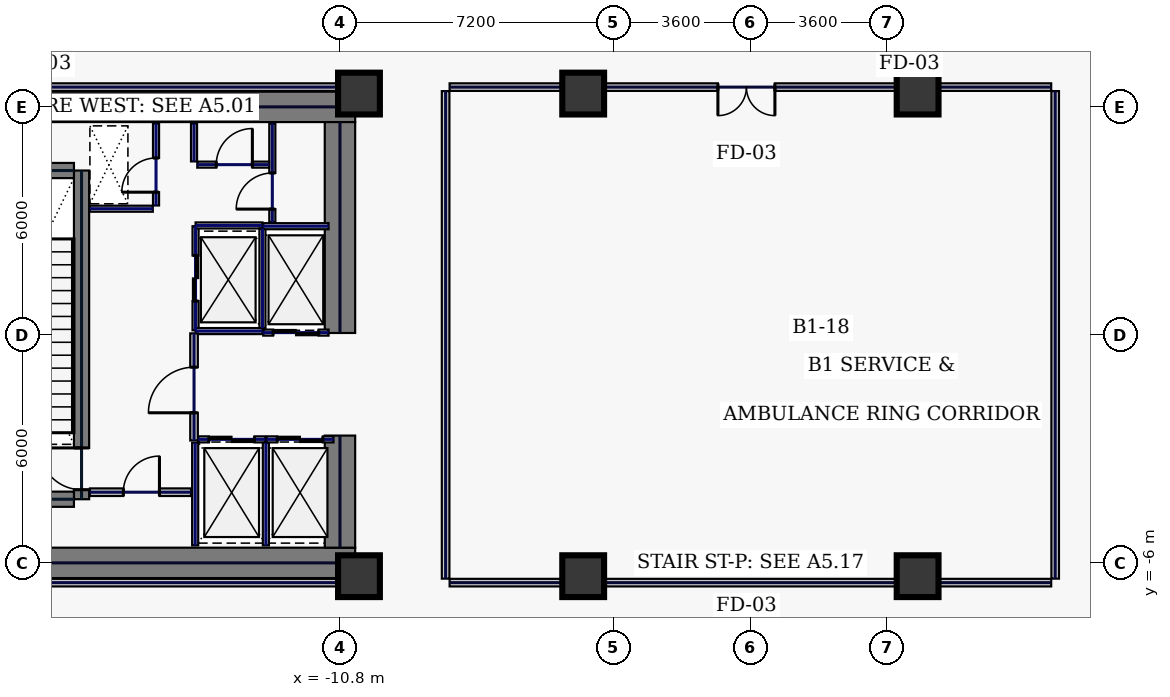
"""IFC4 building model, lengths in metres.
Left out: names, types, materials, properties, quantities, classifications, styles, units other than length and angle.
Written with IfcOpenShell. Run it as: python <this file> out.ifc"""

import sys

from ifc_helpers import new_model, si_unit, direction, frame, frame_2d, origin, origin_2d, place, context, subcontext, project, spatial, rectangle, extrude, element, fill, save


model = new_model("IFC4")
c1 = context("Model", 3, precision=1e-05, world=origin(), true_north=direction((0.0, 1.0)))
c2 = subcontext(c1, "Body", "Model", "MODEL_VIEW")
j1 = project(units=[si_unit("LENGTHUNIT", "METRE"), si_unit("PLANEANGLEUNIT", "RADIAN")], contexts=[c1])
p1 = place(None, origin())
s1 = spatial("IfcSite", under=j1, at=p1, CompositionType="ELEMENT")
p2 = place(p1, origin())
s2 = spatial("IfcBuilding", under=s1, at=p2, CompositionType="ELEMENT")
p3 = place(p2, frame((0.0, 0.0, -5.4)))
s3 = spatial("IfcBuildingStorey", under=s2, at=p3, CompositionType="ELEMENT", Elevation=-5.4)
for number, where, z_axis, x_axis in (
    (1, (-22.0, 6.0, 0.0), (0.0, 0.0, 1.0), (1.0, 0.0, 0.0)),
    (2, (-22.0, -6.0, 0.0), (0.0, 0.0, 1.0), (1.0, 0.0, 0.0)),
):
    element("IfcWall", number, at=place(p3, frame(where, z_axis=z_axis, x_axis=x_axis)), inside=s3, PredefinedType="SHEAR", context=c2, shape_type="SweptSolid", body=[
        extrude(rectangle(XDim=11.6, YDim=0.8, at=frame_2d((5.8, 0.0))), origin(), (0.0, 0.0, 1.0), 5.05),
    ])
p4 = place(p3, frame((-10.8, -5.6, 0.0), z_axis=(0.0, 0.0, 1.0), x_axis=(0.0, 1.0, 0.0)))
e3 = element("IfcWall", 3, at=p4, inside=s3, PredefinedType="SHEAR", context=c2, shape_type="SweptSolid", body=[
    extrude(rectangle(XDim=2.95, YDim=0.8, at=frame_2d((1.475, 0.0))), origin(), (0.0, 0.0, 1.0), 5.05),
])
p5 = place(p3, frame((-10.8, 0.05, 0.0), z_axis=(0.0, 0.0, 1.0), x_axis=(0.0, 1.0, 0.0)))
e4 = element("IfcWall", 4, at=p5, inside=s3, PredefinedType="SHEAR", context=c2, shape_type="SweptSolid", body=[
    extrude(rectangle(XDim=5.55, YDim=0.8, at=frame_2d((2.775, 0.0))), origin(), (0.0, 0.0, 1.0), 5.05),
])
p6 = place(p3, frame((-17.6, -4.325, 0.0), z_axis=(0.0, 0.0, 1.0), x_axis=(0.0, 1.0, 0.0)))
e5 = element("IfcWall", 5, at=p6, inside=s3, PredefinedType="SHEAR", context=c2, shape_type="SweptSolid", body=[
    extrude(rectangle(XDim=8.65, YDim=0.4, at=frame_2d((4.325, 0.0))), origin(), (0.0, 0.0, 1.0), 5.05),
])
p7 = place(p6, frame((0.25, 0.0, 0.0)))
e6 = element("IfcOpeningElement", 6, at=p7, cuts=e5, PredefinedType="OPENING", context=c2, shape_type="SweptSolid", body=[
    extrude(rectangle(XDim=1.1, YDim=2.2, at=frame_2d((0.55, 1.1))), frame((0.0, 0.21, 0.0), z_axis=(0.0, -1.0, 0.0), x_axis=(1.0, 0.0, 0.0)), (0.0, 0.0, 1.0), 0.42),
])
for number, where, z_axis, x_axis in (
    (7, (-21.2, -4.325, 0.0), (0.0, 0.0, 1.0), (1.0, 0.0, 0.0)),
    (8, (-21.2, 4.325, 0.0), (0.0, 0.0, 1.0), (1.0, 0.0, 0.0)),
):
    element("IfcWall", number, at=place(p3, frame(where, z_axis=z_axis, x_axis=x_axis)), inside=s3, PredefinedType="SHEAR", context=c2, shape_type="SweptSolid", body=[
        extrude(rectangle(XDim=3.4, YDim=0.4, at=frame_2d((1.7, 0.0))), origin(), (0.0, 0.0, 1.0), 5.05),
    ])
for number, where, z_axis, x_axis in (
    (9, (-10.3, -6.35, 0.0), (0.0, 0.0, 1.0), (1.0, 0.0, 0.0)),
    (10, (-10.3, 6.35, 0.0), (0.0, 0.0, 1.0), (1.0, 0.0, 0.0)),
    (11, (-4.4, -6.35, 0.0), (0.0, 0.0, 1.0), (1.0, 0.0, 0.0)),
    (12, (4.4, -6.35, 0.0), (0.0, 0.0, 1.0), (1.0, 0.0, 0.0)),
    (13, (-4.4, 6.35, 0.0), (0.0, 0.0, 1.0), (1.0, 0.0, 0.0)),
    (14, (4.4, 6.35, 0.0), (0.0, 0.0, 1.0), (1.0, 0.0, 0.0)),
):
    element("IfcColumn", number, at=place(p3, frame(where, z_axis=z_axis, x_axis=x_axis)), inside=s3, PredefinedType="COLUMN", context=c2, shape_type="SweptSolid", body=[
        extrude(rectangle(XDim=1.1, YDim=1.1, at=origin_2d()), origin(), (0.0, 0.0, 1.0), 5.05),
    ])
p8 = place(p3, frame((-14.6, 0.12, 0.0), z_axis=(0.0, 0.0, 1.0), x_axis=(0.0, 1.0, 0.0)))
e15 = element("IfcWall", 15, at=p8, inside=s3, PredefinedType="PARTITIONING", context=c2, shape_type="SweptSolid", body=[
    extrude(rectangle(XDim=2.74, YDim=0.16, at=frame_2d((1.37, 0.0))), origin(), (0.0, 0.0, 1.0), 5.05),
])
p9 = place(p8, frame((0.77, 0.0, 0.0)))
e16 = element("IfcOpeningElement", 16, at=p9, cuts=e15, PredefinedType="OPENING", context=c2, shape_type="SweptSolid", body=[
    extrude(rectangle(XDim=1.2, YDim=2.2, at=frame_2d((0.6, 1.1))), frame((0.0, 0.09, 0.0), z_axis=(0.0, -1.0, 0.0), x_axis=(1.0, 0.0, 0.0)), (0.0, 0.0, 1.0), 0.18),
])
for number, where, z_axis, x_axis in (
    (17, (-14.6, 0.1, 0.0), (0.0, 0.0, 1.0), (1.0, 0.0, 0.0)),
    (18, (-14.6, 2.88, 0.0), (0.0, 0.0, 1.0), (1.0, 0.0, 0.0)),
):
    element("IfcWall", number, at=place(p3, frame(where, z_axis=z_axis, x_axis=x_axis)), inside=s3, PredefinedType="PARTITIONING", context=c2, shape_type="SweptSolid", body=[
        extrude(rectangle(XDim=1.76, YDim=0.16, at=frame_2d((0.88, 0.0))), origin(), (0.0, 0.0, 1.0), 5.05),
    ])
p10 = place(p3, frame((-12.84, 0.18, 0.0), z_axis=(0.0, 0.0, 1.0), x_axis=(0.0, 1.0, 0.0)))
e19 = element("IfcWall", 19, at=p10, inside=s3, PredefinedType="PARTITIONING", context=c2, shape_type="SweptSolid", body=[
    extrude(rectangle(XDim=2.62, YDim=0.16, at=frame_2d((1.31, 0.0))), origin(), (0.0, 0.0, 1.0), 5.05),
])
p11 = place(p3, frame((-14.53, -2.75, 0.0), z_axis=(0.0, 0.0, 1.0), x_axis=(1.0, 0.0, 0.0)))
e20 = element("IfcWall", 20, at=p11, inside=s3, PredefinedType="PARTITIONING", context=c2, shape_type="SweptSolid", body=[
    extrude(rectangle(XDim=1.76, YDim=0.16, at=frame_2d((0.88, 0.0))), origin(), (0.0, 0.0, 1.0), 5.05),
])
p12 = place(p11, frame((0.28, 0.0, 0.0)))
e21 = element("IfcOpeningElement", 21, at=p12, cuts=e20, PredefinedType="OPENING", context=c2, shape_type="SweptSolid", body=[
    extrude(rectangle(XDim=1.2, YDim=2.2, at=frame_2d((0.6, 1.1))), frame((0.0, 0.09, 0.0), z_axis=(0.0, -1.0, 0.0), x_axis=(1.0, 0.0, 0.0)), (0.0, 0.0, 1.0), 0.18),
])
for number, where, z_axis, x_axis in (
    (22, (-12.75, -5.54, 0.0), (0.0, 0.0, 1.0), (0.0, 1.0, 0.0)),
    (23, (-14.61, -5.54, 0.0), (0.0, 0.0, 1.0), (0.0, 1.0, 0.0)),
):
    element("IfcWall", number, at=place(p3, frame(where, z_axis=z_axis, x_axis=x_axis)), inside=s3, PredefinedType="PARTITIONING", context=c2, shape_type="SweptSolid", body=[
        extrude(rectangle(XDim=2.7, YDim=0.16, at=frame_2d((1.35, 0.0))), origin(), (0.0, 0.0, 1.0), 5.05),
    ])
p13 = place(p3, frame((-12.73, -2.75, 0.0), z_axis=(0.0, 0.0, 1.0), x_axis=(1.0, 0.0, 0.0)))
e24 = element("IfcWall", 24, at=p13, inside=s3, PredefinedType="PARTITIONING", context=c2, shape_type="SweptSolid", body=[
    extrude(rectangle(XDim=1.76, YDim=0.16, at=frame_2d((0.88, 0.0))), origin(), (0.0, 0.0, 1.0), 5.05),
])
p14 = place(p13, frame((0.28, 0.0, 0.0)))
e25 = element("IfcOpeningElement", 25, at=p14, cuts=e24, PredefinedType="OPENING", context=c2, shape_type="SweptSolid", body=[
    extrude(rectangle(XDim=1.2, YDim=2.2, at=frame_2d((0.6, 1.1))), frame((0.0, 0.09, 0.0), z_axis=(0.0, -1.0, 0.0), x_axis=(1.0, 0.0, 0.0)), (0.0, 0.0, 1.0), 0.18),
])
p15 = place(p3, frame((-12.82, 0.06, 0.0), z_axis=(0.0, 0.0, 1.0), x_axis=(1.0, 0.0, 0.0)))
e26 = element("IfcWall", 26, at=p15, inside=s3, PredefinedType="PARTITIONING", context=c2, shape_type="SweptSolid", body=[
    extrude(rectangle(XDim=1.72, YDim=0.16, at=frame_2d((0.86, 0.0))), origin(), (0.0, 0.0, 1.0), 5.05),
])
p16 = place(p15, frame((0.26, 0.0, 0.0)))
e27 = element("IfcOpeningElement", 27, at=p16, cuts=e26, PredefinedType="OPENING", context=c2, shape_type="SweptSolid", body=[
    extrude(rectangle(XDim=1.2, YDim=2.2, at=frame_2d((0.6, 1.1))), frame((0.0, 0.09, 0.0), z_axis=(0.0, -1.0, 0.0), x_axis=(1.0, 0.0, 0.0)), (0.0, 0.0, 1.0), 0.18),
])
p17 = place(p3, frame((-12.82, 2.86, 0.0), z_axis=(0.0, 0.0, 1.0), x_axis=(1.0, 0.0, 0.0)))
e28 = element("IfcWall", 28, at=p17, inside=s3, PredefinedType="PARTITIONING", context=c2, shape_type="SweptSolid", body=[
    extrude(rectangle(XDim=1.72, YDim=0.16, at=frame_2d((0.86, 0.0))), origin(), (0.0, 0.0, 1.0), 5.05),
])
p18 = place(p3, frame((-15.64, 3.405, 0.0), z_axis=(0.0, 0.0, 1.0), x_axis=(0.0, 1.0, 0.0)))
e29 = element("IfcWall", 29, at=p18, inside=s3, PredefinedType="PARTITIONING", context=c2, shape_type="SweptSolid", body=[
    extrude(rectangle(XDim=2.155, YDim=0.16, at=frame_2d((1.078, 0.0))), origin(), (0.0, 0.0, 1.0), 5.05),
])
p19 = place(p18, frame((0.35, 0.0, 0.0)))
e30 = element("IfcOpeningElement", 30, at=p19, cuts=e29, PredefinedType="OPENING", context=c2, shape_type="SweptSolid", body=[
    extrude(rectangle(XDim=0.9, YDim=2.2, at=frame_2d((0.45, 1.1))), frame((0.0, 0.09, 0.0), z_axis=(0.0, -1.0, 0.0), x_axis=(1.0, 0.0, 0.0)), (0.0, 0.0, 1.0), 0.18),
])
p20 = place(p3, frame((-17.38, 3.32, 0.0), z_axis=(0.0, 0.0, 1.0), x_axis=(1.0, 0.0, 0.0)))
e31 = element("IfcWall", 31, at=p20, inside=s3, PredefinedType="PARTITIONING", context=c2, shape_type="SweptSolid", body=[
    extrude(rectangle(XDim=1.655, YDim=0.16, at=frame_2d((0.827, 0.0))), origin(), (0.0, 0.0, 1.0), 5.05),
])
p21 = place(p3, frame((-17.38, -4.14, 0.0), z_axis=(0.0, 0.0, 1.0), x_axis=(1.0, 0.0, 0.0)))
e32 = element("IfcWall", 32, at=p21, inside=s3, PredefinedType="SOLIDWALL", context=c2, shape_type="SweptSolid", body=[
    extrude(rectangle(XDim=2.66, YDim=0.2, at=frame_2d((1.33, 0.0))), origin(), (0.0, 0.0, 1.0), 5.05),
])
p22 = place(p21, frame((0.88, 0.0, 0.0)))
e33 = element("IfcOpeningElement", 33, at=p22, cuts=e32, PredefinedType="OPENING", context=c2, shape_type="SweptSolid", body=[
    extrude(rectangle(XDim=0.95, YDim=2.2, at=frame_2d((0.475, 1.1))), frame((0.0, 0.11, 0.0), z_axis=(0.0, -1.0, 0.0), x_axis=(1.0, 0.0, 0.0)), (0.0, 0.0, 1.0), 0.22),
])
p23 = place(p3, frame((-12.58, 2.96, 0.0), z_axis=(0.0, 0.0, 1.0), x_axis=(0.0, 1.0, 0.0)))
e34 = element("IfcWall", 34, at=p23, inside=s3, PredefinedType="PARTITIONING", context=c2, shape_type="SweptSolid", body=[
    extrude(rectangle(XDim=2.6, YDim=0.16, at=frame_2d((1.3, 0.0))), origin(), (0.0, 0.0, 1.0), 5.05),
])
p24 = place(p23, frame((0.35, 0.0, 0.0)))
e35 = element("IfcOpeningElement", 35, at=p24, cuts=e34, PredefinedType="OPENING", context=c2, shape_type="SweptSolid", body=[
    extrude(rectangle(XDim=0.95, YDim=2.2, at=frame_2d((0.475, 1.1))), frame((0.0, 0.09, 0.0), z_axis=(0.0, -1.0, 0.0), x_axis=(1.0, 0.0, 0.0)), (0.0, 0.0, 1.0), 0.18),
])
p25 = place(p3, frame((-14.555, 4.48, 0.0), z_axis=(0.0, 0.0, 1.0), x_axis=(1.0, 0.0, 0.0)))
e36 = element("IfcWall", 36, at=p25, inside=s3, PredefinedType="PARTITIONING", context=c2, shape_type="SweptSolid", body=[
    extrude(rectangle(XDim=1.89, YDim=0.16, at=frame_2d((0.945, 0.0))), origin(), (0.0, 0.0, 1.0), 5.05),
])
p26 = place(p25, frame((0.5, 0.0, 0.0)))
e37 = element("IfcOpeningElement", 37, at=p26, cuts=e36, PredefinedType="OPENING", context=c2, shape_type="SweptSolid", body=[
    extrude(rectangle(XDim=0.95, YDim=2.2, at=frame_2d((0.475, 1.1))), frame((0.0, 0.09, 0.0), z_axis=(0.0, -1.0, 0.0), x_axis=(1.0, 0.0, 0.0)), (0.0, 0.0, 1.0), 0.18),
])
p27 = place(p3, frame((-14.64, 4.565, 0.0), z_axis=(0.0, 0.0, 1.0), x_axis=(0.0, 1.0, 0.0)))
e38 = element("IfcWall", 38, at=p27, inside=s3, PredefinedType="PARTITIONING", context=c2, shape_type="SweptSolid", body=[
    extrude(rectangle(XDim=0.995, YDim=0.16, at=frame_2d((0.498, 0.0))), origin(), (0.0, 0.0, 1.0), 5.05),
])
p28 = place(p3, frame((-14.64, -2.78, 0.0), z_axis=(0.0, 0.0, 1.0), x_axis=(0.0, 1.0, 0.0)))
e39 = element("IfcWall", 39, at=p28, inside=s3, PredefinedType="SOLIDWALL", context=c2, shape_type="SweptSolid", body=[
    extrude(rectangle(XDim=2.82, YDim=0.2, at=frame_2d((1.41, 0.0))), origin(), (0.0, 0.0, 1.0), 5.05),
])
p29 = place(p28, frame((0.73, 0.0, 0.0)))
e40 = element("IfcOpeningElement", 40, at=p29, cuts=e39, PredefinedType="OPENING", context=c2, shape_type="SweptSolid", body=[
    extrude(rectangle(XDim=1.2, YDim=2.2, at=frame_2d((0.6, 1.1))), frame((0.0, 0.11, 0.0), z_axis=(0.0, -1.0, 0.0), x_axis=(1.0, 0.0, 0.0)), (0.0, 0.0, 1.0), 0.22),
])
p30 = place(p3, frame((8.02, -6.415, 0.0), z_axis=(0.0, 0.0, 1.0), x_axis=(0.0, 1.0, 0.0)))
e41 = element("IfcWall", 41, at=p30, inside=s3, PredefinedType="SOLIDWALL", context=c2, shape_type="SweptSolid", body=[
    extrude(rectangle(XDim=12.83, YDim=0.2, at=frame_2d((6.415, 0.0))), origin(), (0.0, 0.0, 1.0), 5.05),
])
p31 = place(p3, frame((7.915, 6.52, 0.0), z_axis=(0.0, 0.0, 1.0), x_axis=(-1.0, 0.0, 0.0)))
e42 = element("IfcWall", 42, at=p31, inside=s3, PredefinedType="SOLIDWALL", context=c2, shape_type="SweptSolid", body=[
    extrude(rectangle(XDim=15.83, YDim=0.2, at=frame_2d((7.915, 0.0))), origin(), (0.0, 0.0, 1.0), 4.245),
])
p32 = place(p31, frame((7.27, 0.0, 0.0)))
e43 = element("IfcOpeningElement", 43, at=p32, cuts=e42, PredefinedType="OPENING", context=c2, shape_type="SweptSolid", body=[
    extrude(rectangle(XDim=1.5, YDim=2.3, at=frame_2d((0.75, 1.15))), frame((0.0, 0.11, 0.0), z_axis=(0.0, -1.0, 0.0), x_axis=(1.0, 0.0, 0.0)), (0.0, 0.0, 1.0), 0.22),
])
p33 = place(p3, frame((-8.02, 6.415, 0.0), z_axis=(0.0, 0.0, 1.0), x_axis=(0.0, -1.0, 0.0)))
e44 = element("IfcWall", 44, at=p33, inside=s3, PredefinedType="SOLIDWALL", context=c2, shape_type="SweptSolid", body=[
    extrude(rectangle(XDim=12.83, YDim=0.2, at=frame_2d((6.415, 0.0))), origin(), (0.0, 0.0, 1.0), 5.05),
])
p34 = place(p3, frame((-7.915, -6.52, 0.0), z_axis=(0.0, 0.0, 1.0), x_axis=(1.0, 0.0, 0.0)))
e45 = element("IfcWall", 45, at=p34, inside=s3, PredefinedType="SOLIDWALL", context=c2, shape_type="SweptSolid", body=[
    extrude(rectangle(XDim=15.83, YDim=0.2, at=frame_2d((7.915, 0.0))), origin(), (0.0, 0.0, 1.0), 4.245),
])
for number, where, z_axis, x_axis in (
    (46, (-10.38, 6.52, 0.0), (0.0, 0.0, 1.0), (-1.0, 0.0, 0.0)),
    (47, (-25.615, -6.52, 0.0), (0.0, 0.0, 1.0), (1.0, 0.0, 0.0)),
):
    element("IfcWall", number, at=place(p3, frame(where, z_axis=z_axis, x_axis=x_axis)), inside=s3, PredefinedType="SOLIDWALL", context=c2, shape_type="SweptSolid", body=[
        extrude(rectangle(XDim=15.235, YDim=0.2, at=frame_2d((7.618, 0.0))), origin(), (0.0, 0.0, 1.0), 5.05),
    ])
p35 = place(p7, origin())
e48 = element("IfcDoor", 48, at=p35, inside=s3, OperationType="SINGLE_SWING_RIGHT", PredefinedType="DOOR", context=c2, shape_type="SweptSolid", body=[
    extrude(rectangle(XDim=1.1, YDim=2.2, at=frame_2d((0.55, 1.1))), frame((0.0, 0.025, 0.0), z_axis=(0.0, -1.0, 0.0), x_axis=(1.0, 0.0, 0.0)), (0.0, 0.0, 1.0), 0.05),
])
fill(e6, e48)
p36 = place(p9, origin())
e49 = element("IfcDoor", 49, at=p36, inside=s3, OperationType="SLIDING_TO_LEFT", PredefinedType="DOOR", context=c2, shape_type="SweptSolid", body=[
    extrude(rectangle(XDim=1.2, YDim=2.2, at=frame_2d((0.6, 1.1))), frame((0.0, 0.025, 0.0), z_axis=(0.0, -1.0, 0.0), x_axis=(1.0, 0.0, 0.0)), (0.0, 0.0, 1.0), 0.05),
])
fill(e16, e49)
p37 = place(p12, origin())
e50 = element("IfcDoor", 50, at=p37, inside=s3, OperationType="SLIDING_TO_LEFT", PredefinedType="DOOR", context=c2, shape_type="SweptSolid", body=[
    extrude(rectangle(XDim=1.2, YDim=2.2, at=frame_2d((0.6, 1.1))), frame((0.0, 0.025, 0.0), z_axis=(0.0, -1.0, 0.0), x_axis=(1.0, 0.0, 0.0)), (0.0, 0.0, 1.0), 0.05),
])
fill(e21, e50)
p38 = place(p14, origin())
e51 = element("IfcDoor", 51, at=p38, inside=s3, OperationType="SLIDING_TO_LEFT", PredefinedType="DOOR", context=c2, shape_type="SweptSolid", body=[
    extrude(rectangle(XDim=1.2, YDim=2.2, at=frame_2d((0.6, 1.1))), frame((0.0, 0.025, 0.0), z_axis=(0.0, -1.0, 0.0), x_axis=(1.0, 0.0, 0.0)), (0.0, 0.0, 1.0), 0.05),
])
fill(e25, e51)
p39 = place(p16, origin())
e52 = element("IfcDoor", 52, at=p39, inside=s3, OperationType="SLIDING_TO_LEFT", PredefinedType="DOOR", context=c2, shape_type="SweptSolid", body=[
    extrude(rectangle(XDim=1.2, YDim=2.2, at=frame_2d((0.6, 1.1))), frame((0.0, 0.025, 0.0), z_axis=(0.0, -1.0, 0.0), x_axis=(1.0, 0.0, 0.0)), (0.0, 0.0, 1.0), 0.05),
])
fill(e27, e52)
p40 = place(p19, origin())
e53 = element("IfcDoor", 53, at=p40, inside=s3, OperationType="SINGLE_SWING_LEFT", PredefinedType="DOOR", context=c2, shape_type="SweptSolid", body=[
    extrude(rectangle(XDim=0.9, YDim=2.2, at=frame_2d((0.45, 1.1))), frame((0.0, 0.025, 0.0), z_axis=(0.0, -1.0, 0.0), x_axis=(1.0, 0.0, 0.0)), (0.0, 0.0, 1.0), 0.05),
])
fill(e30, e53)
p41 = place(p22, origin())
e54 = element("IfcDoor", 54, at=p41, inside=s3, OperationType="SINGLE_SWING_RIGHT", PredefinedType="DOOR", context=c2, shape_type="SweptSolid", body=[
    extrude(rectangle(XDim=0.95, YDim=2.2, at=frame_2d((0.475, 1.1))), frame((0.0, 0.025, 0.0), z_axis=(0.0, -1.0, 0.0), x_axis=(1.0, 0.0, 0.0)), (0.0, 0.0, 1.0), 0.05),
])
fill(e33, e54)
p42 = place(p24, origin())
e55 = element("IfcDoor", 55, at=p42, inside=s3, OperationType="SINGLE_SWING_LEFT", PredefinedType="DOOR", context=c2, shape_type="SweptSolid", body=[
    extrude(rectangle(XDim=0.95, YDim=2.2, at=frame_2d((0.475, 1.1))), frame((0.0, 0.025, 0.0), z_axis=(0.0, -1.0, 0.0), x_axis=(1.0, 0.0, 0.0)), (0.0, 0.0, 1.0), 0.05),
])
fill(e35, e55)
p43 = place(p26, origin())
e56 = element("IfcDoor", 56, at=p43, inside=s3, OperationType="SINGLE_SWING_RIGHT", PredefinedType="DOOR", context=c2, shape_type="SweptSolid", body=[
    extrude(rectangle(XDim=0.95, YDim=2.2, at=frame_2d((0.475, 1.1))), frame((0.0, 0.025, 0.0), z_axis=(0.0, -1.0, 0.0), x_axis=(1.0, 0.0, 0.0)), (0.0, 0.0, 1.0), 0.05),
])
fill(e37, e56)
p44 = place(p29, origin())
e57 = element("IfcDoor", 57, at=p44, inside=s3, OperationType="SINGLE_SWING_LEFT", PredefinedType="DOOR", context=c2, shape_type="SweptSolid", body=[
    extrude(rectangle(XDim=1.2, YDim=2.2, at=frame_2d((0.6, 1.1))), frame((0.0, 0.025, 0.0), z_axis=(0.0, -1.0, 0.0), x_axis=(1.0, 0.0, 0.0)), (0.0, 0.0, 1.0), 0.05),
])
fill(e40, e57)
p45 = place(p32, origin())
e58 = element("IfcDoor", 58, at=p45, inside=s3, OperationType="DOUBLE_SWING_LEFT", PredefinedType="DOOR", context=c2, shape_type="SweptSolid", body=[
    extrude(rectangle(XDim=1.5, YDim=2.3, at=frame_2d((0.75, 1.15))), frame((0.0, 0.025, 0.0), z_axis=(0.0, -1.0, 0.0), x_axis=(1.0, 0.0, 0.0)), (0.0, 0.0, 1.0), 0.05),
])
fill(e43, e58)
save(model, sys.argv[1])
